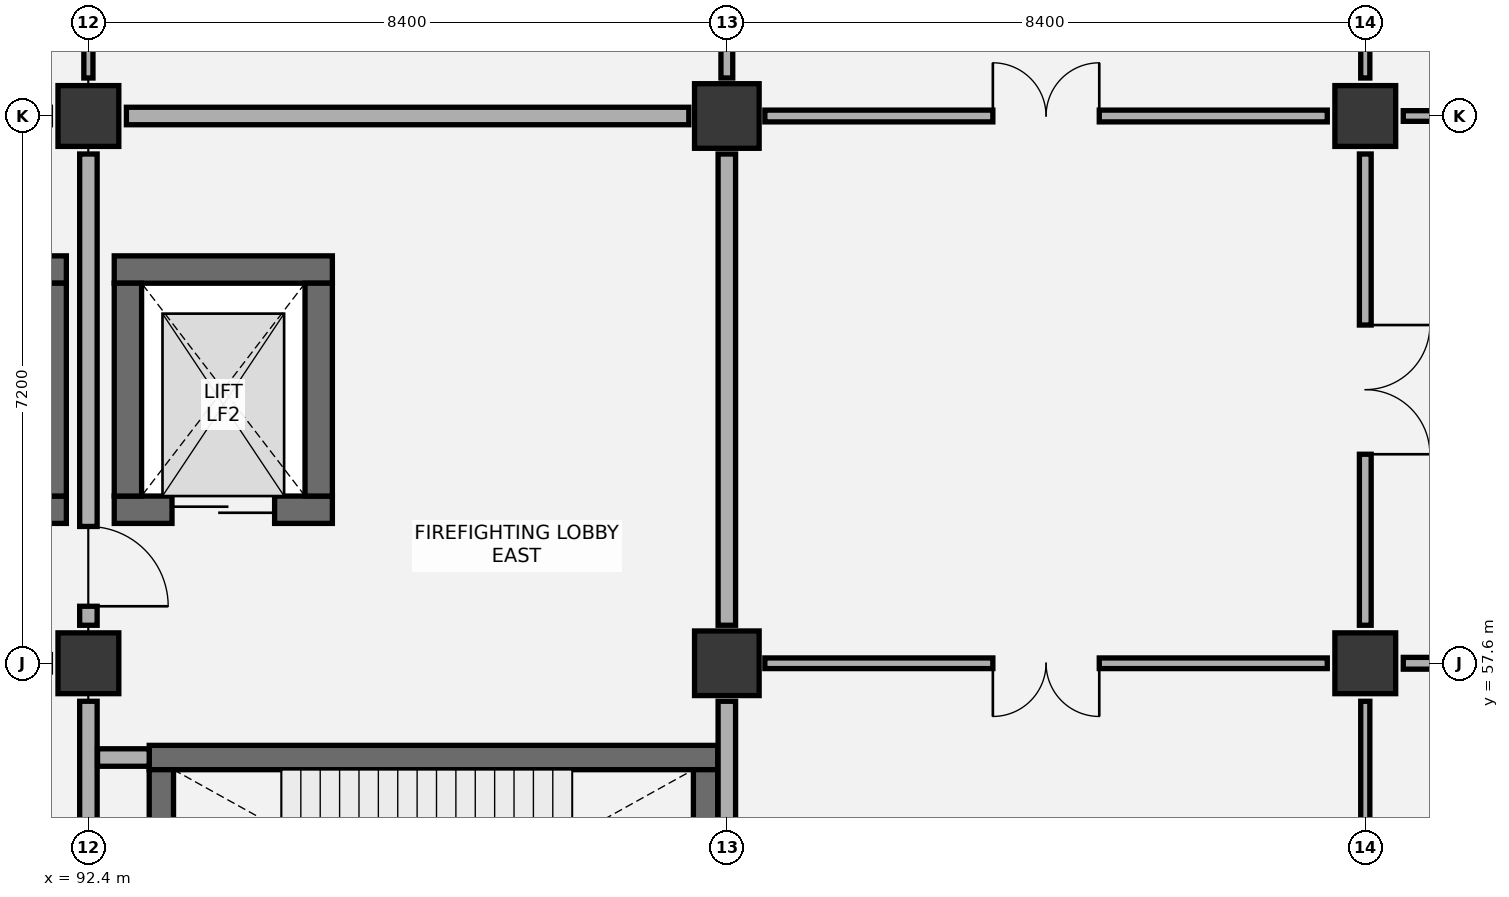
"""IFC4 building model, lengths in metres.
Left out: names, types, materials, properties, quantities, classifications, styles, units other than length and angle.
Written with IfcOpenShell. Run it as: python <this file> out.ifc"""

import sys

from ifc_helpers import new_model, si_unit, direction, frame, frame_2d, origin, origin_2d, place, context, subcontext, project, spatial, rectangle, extrude, element, fill, save


model = new_model("IFC4")
c1 = context("Model", 3, precision=1e-05, world=origin(), true_north=direction((0.0, 1.0)))
c2 = subcontext(c1, "Body", "Model", "MODEL_VIEW")
j1 = project(units=[si_unit("LENGTHUNIT", "METRE"), si_unit("PLANEANGLEUNIT", "RADIAN")], contexts=[c1])
p1 = place(None, origin())
s1 = spatial("IfcSite", under=j1, at=p1, CompositionType="ELEMENT")
p2 = place(p1, origin())
s2 = spatial("IfcBuilding", under=s1, at=p2, CompositionType="ELEMENT")
p3 = place(p2, frame((0.0, 0.0, 11.4)))
s3 = spatial("IfcBuildingStorey", under=s2, at=p3, CompositionType="ELEMENT", Elevation=11.4)
for number, where, z_axis, x_axis in (
    (1, (92.4, 57.6, 0.0), (0.0, 0.0, 1.0), (1.0, 0.0, 0.0)),
    (2, (92.4, 64.8, 0.0), (0.0, 0.0, 1.0), (1.0, 0.0, 0.0)),
):
    element("IfcColumn", number, at=place(p3, frame(where, z_axis=z_axis, x_axis=x_axis)), inside=s3, PredefinedType="COLUMN", context=c2, shape_type="SweptSolid", body=[
        extrude(rectangle(XDim=0.8, YDim=0.8, at=origin_2d()), origin(), (0.0, 0.0, 1.0), 5.4),
    ])
for number, where, z_axis, x_axis in (
    (3, (100.8, 57.6, 0.0), (0.0, 0.0, 1.0), (1.0, 0.0, 0.0)),
    (4, (100.8, 64.8, 0.0), (0.0, 0.0, 1.0), (1.0, 0.0, 0.0)),
):
    element("IfcColumn", number, at=place(p3, frame(where, z_axis=z_axis, x_axis=x_axis)), inside=s3, PredefinedType="COLUMN", context=c2, shape_type="SweptSolid", body=[
        extrude(rectangle(XDim=0.85, YDim=0.85, at=origin_2d()), origin(), (0.0, 0.0, 1.0), 5.4),
    ])
for number, where, z_axis, x_axis in (
    (5, (109.2, 57.6, 0.0), (0.0, 0.0, 1.0), (1.0, 0.0, 0.0)),
    (6, (109.2, 64.8, 0.0), (0.0, 0.0, 1.0), (1.0, 0.0, 0.0)),
):
    element("IfcColumn", number, at=place(p3, frame(where, z_axis=z_axis, x_axis=x_axis)), inside=s3, PredefinedType="COLUMN", context=c2, shape_type="SweptSolid", body=[
        extrude(rectangle(XDim=0.8, YDim=0.8, at=origin_2d()), origin(), (0.0, 0.0, 1.0), 5.4),
    ])
p4 = place(p3, frame((93.2, 56.36, 0.0), z_axis=(0.0, 0.0, 1.0), x_axis=(1.0, 0.0, 0.0)))
e7 = element("IfcWall", 7, at=p4, inside=s3, PredefinedType="SHEAR", context=c2, shape_type="SweptSolid", body=[
    extrude(rectangle(XDim=7.48, YDim=0.32, at=frame_2d((3.74, 0.0))), origin(), (0.0, 0.0, 1.0), 5.1),
])
for number, where, z_axis, x_axis in (
    (8, (93.36, 52.4, 0.0), (0.0, 0.0, 1.0), (0.0, 1.0, 0.0)),
    (9, (100.52, 52.4, 0.0), (0.0, 0.0, 1.0), (0.0, 1.0, 0.0)),
):
    element("IfcWall", number, at=place(p3, frame(where, z_axis=z_axis, x_axis=x_axis)), inside=s3, PredefinedType="SHEAR", context=c2, shape_type="SweptSolid", body=[
        extrude(rectangle(XDim=3.8, YDim=0.32, at=frame_2d((1.9, 0.0))), origin(), (0.0, 0.0, 1.0), 5.1),
    ])
p5 = place(p3, frame((84.34, 62.78, 0.0), z_axis=(0.0, 0.0, 1.0), x_axis=(1.0, 0.0, 0.0)))
e10 = element("IfcWall", 10, at=p5, inside=s3, PredefinedType="SHEAR", context=c2, shape_type="SweptSolid", body=[
    extrude(rectangle(XDim=7.77, YDim=0.36, at=frame_2d((3.885, 0.0))), origin(), (0.0, 0.0, 1.0), 5.1),
])
p6 = place(p3, frame((89.45, 59.62, 0.0), z_axis=(0.0, 0.0, 1.0), x_axis=(1.0, 0.0, 0.0)))
e11 = element("IfcWall", 11, at=p6, inside=s3, PredefinedType="SHEAR", context=c2, shape_type="SweptSolid", body=[
    extrude(rectangle(XDim=2.66, YDim=0.36, at=frame_2d((1.33, 0.0))), origin(), (0.0, 0.0, 1.0), 5.1),
])
p7 = place(p6, frame((0.78, 0.0, 0.0)))
e12 = element("IfcOpeningElement", 12, at=p7, cuts=e11, PredefinedType="OPENING", context=c2, shape_type="SweptSolid", body=[
    extrude(rectangle(XDim=1.1, YDim=2.15, at=frame_2d((0.55, 1.075))), frame((0.0, 0.19, 0.0), z_axis=(0.0, -1.0, 0.0), x_axis=(1.0, 0.0, 0.0)), (0.0, 0.0, 1.0), 0.38),
])
p8 = place(p3, frame((91.93, 59.8, 0.0), z_axis=(0.0, 0.0, 1.0), x_axis=(0.0, 1.0, 0.0)))
e13 = element("IfcWall", 13, at=p8, inside=s3, PredefinedType="SHEAR", context=c2, shape_type="SweptSolid", body=[
    extrude(rectangle(XDim=2.8, YDim=0.36, at=frame_2d((1.4, 0.0))), origin(), (0.0, 0.0, 1.0), 5.1),
])
p9 = place(p3, frame((92.74, 62.78, 0.0), z_axis=(0.0, 0.0, 1.0), x_axis=(1.0, 0.0, 0.0)))
e14 = element("IfcWall", 14, at=p9, inside=s3, PredefinedType="SHEAR", context=c2, shape_type="SweptSolid", body=[
    extrude(rectangle(XDim=2.87, YDim=0.36, at=frame_2d((1.435, 0.0))), origin(), (0.0, 0.0, 1.0), 5.1),
])
p10 = place(p3, frame((92.74, 59.62, 0.0), z_axis=(0.0, 0.0, 1.0), x_axis=(1.0, 0.0, 0.0)))
e15 = element("IfcWall", 15, at=p10, inside=s3, PredefinedType="SHEAR", context=c2, shape_type="SweptSolid", body=[
    extrude(rectangle(XDim=2.87, YDim=0.36, at=frame_2d((1.435, 0.0))), origin(), (0.0, 0.0, 1.0), 5.1),
])
p11 = place(p10, frame((0.76, 0.0, 0.0)))
e16 = element("IfcOpeningElement", 16, at=p11, cuts=e15, PredefinedType="OPENING", context=c2, shape_type="SweptSolid", body=[
    extrude(rectangle(XDim=1.35, YDim=2.2, at=frame_2d((0.675, 1.1))), frame((0.0, 0.19, 0.0), z_axis=(0.0, -1.0, 0.0), x_axis=(1.0, 0.0, 0.0)), (0.0, 0.0, 1.0), 0.38),
])
for number, where, z_axis, x_axis in (
    (17, (92.92, 59.8, 0.0), (0.0, 0.0, 1.0), (0.0, 1.0, 0.0)),
    (18, (95.43, 59.8, 0.0), (0.0, 0.0, 1.0), (0.0, 1.0, 0.0)),
):
    element("IfcWall", number, at=place(p3, frame(where, z_axis=z_axis, x_axis=x_axis)), inside=s3, PredefinedType="SHEAR", context=c2, shape_type="SweptSolid", body=[
        extrude(rectangle(XDim=2.8, YDim=0.36, at=frame_2d((1.4, 0.0))), origin(), (0.0, 0.0, 1.0), 5.1),
    ])
p12 = place(p3, frame((92.4, 50.9, 0.0), z_axis=(0.0, 0.0, 1.0), x_axis=(0.0, 1.0, 0.0)))
e19 = element("IfcWall", 19, at=p12, inside=s3, PredefinedType="PARTITIONING", context=c2, shape_type="SweptSolid", body=[
    extrude(rectangle(XDim=6.2, YDim=0.23, at=frame_2d((3.1, 0.0))), origin(), (0.0, 0.0, 1.0), 4.805),
])
p13 = place(p12, frame((0.05, 0.0, 0.0)))
e20 = element("IfcOpeningElement", 20, at=p13, cuts=e19, PredefinedType="OPENING", context=c2, shape_type="SweptSolid", body=[
    extrude(rectangle(XDim=1.05, YDim=2.15, at=frame_2d((0.525, 1.075))), frame((0.0, 0.125, 0.0), z_axis=(0.0, -1.0, 0.0), x_axis=(1.0, 0.0, 0.0)), (0.0, 0.0, 1.0), 0.25),
])
p14 = place(p3, frame((92.4, 58.1, 0.0), z_axis=(0.0, 0.0, 1.0), x_axis=(0.0, 1.0, 0.0)))
e21 = element("IfcWall", 21, at=p14, inside=s3, PredefinedType="PARTITIONING", context=c2, shape_type="SweptSolid", body=[
    extrude(rectangle(XDim=6.2, YDim=0.23, at=frame_2d((3.1, 0.0))), origin(), (0.0, 0.0, 1.0), 4.395),
])
p15 = place(p14, frame((0.25, 0.0, 0.0)))
e22 = element("IfcOpeningElement", 22, at=p15, cuts=e21, PredefinedType="OPENING", context=c2, shape_type="SweptSolid", body=[
    extrude(rectangle(XDim=1.05, YDim=2.15, at=frame_2d((0.525, 1.075))), frame((0.0, 0.125, 0.0), z_axis=(0.0, -1.0, 0.0), x_axis=(1.0, 0.0, 0.0)), (0.0, 0.0, 1.0), 0.25),
])
p16 = place(p3, frame((92.4, 65.3, 0.0), z_axis=(0.0, 0.0, 1.0), x_axis=(0.0, 1.0, 0.0)))
e23 = element("IfcWall", 23, at=p16, inside=s3, PredefinedType="PARTITIONING", context=c2, shape_type="SweptSolid", body=[
    extrude(rectangle(XDim=6.2, YDim=0.12, at=frame_2d((3.1, 0.0))), origin(), (0.0, 0.0, 1.0), 4.595),
])
p17 = place(p3, frame((100.8, 50.9, 0.0), z_axis=(0.0, 0.0, 1.0), x_axis=(0.0, 1.0, 0.0)))
e24 = element("IfcWall", 24, at=p17, inside=s3, PredefinedType="PARTITIONING", context=c2, shape_type="SweptSolid", body=[
    extrude(rectangle(XDim=6.2, YDim=0.23, at=frame_2d((3.1, 0.0))), origin(), (0.0, 0.0, 1.0), 4.395),
])
p18 = place(p3, frame((92.52, 56.36, 0.0), z_axis=(0.0, 0.0, 1.0), x_axis=(1.0, 0.0, 0.0)))
e25 = element("IfcWall", 25, at=p18, inside=s3, PredefinedType="PARTITIONING", context=c2, shape_type="SweptSolid", body=[
    extrude(rectangle(XDim=0.68, YDim=0.23, at=frame_2d((0.34, 0.0))), origin(), (0.0, 0.0, 1.0), 5.1),
])
p19 = place(p3, frame((100.8, 58.1, 0.0), z_axis=(0.0, 0.0, 1.0), x_axis=(0.0, 1.0, 0.0)))
e26 = element("IfcWall", 26, at=p19, inside=s3, PredefinedType="PARTITIONING", context=c2, shape_type="SweptSolid", body=[
    extrude(rectangle(XDim=6.2, YDim=0.23, at=frame_2d((3.1, 0.0))), origin(), (0.0, 0.0, 1.0), 4.595),
])
p20 = place(p3, frame((92.9, 64.8, 0.0), z_axis=(0.0, 0.0, 1.0), x_axis=(1.0, 0.0, 0.0)))
e27 = element("IfcWall", 27, at=p20, inside=s3, PredefinedType="PARTITIONING", context=c2, shape_type="SweptSolid", body=[
    extrude(rectangle(XDim=7.4, YDim=0.23, at=frame_2d((3.7, 0.0))), origin(), (0.0, 0.0, 1.0), 4.345),
])
p21 = place(p3, frame((100.8, 65.3, 0.0), z_axis=(0.0, 0.0, 1.0), x_axis=(0.0, 1.0, 0.0)))
e28 = element("IfcWall", 28, at=p21, inside=s3, PredefinedType="PARTITIONING", context=c2, shape_type="SweptSolid", body=[
    extrude(rectangle(XDim=6.2, YDim=0.155, at=frame_2d((3.1, 0.0))), origin(), (0.0, 0.0, 1.0), 4.395),
])
p22 = place(p21, frame((2.25, 0.0, 0.0)))
e29 = element("IfcOpeningElement", 29, at=p22, cuts=e28, PredefinedType="OPENING", context=c2, shape_type="SweptSolid", body=[
    extrude(rectangle(XDim=1.7, YDim=2.25, at=frame_2d((0.85, 1.125))), frame((0.0, 0.087, 0.0), z_axis=(0.0, -1.0, 0.0), x_axis=(1.0, 0.0, 0.0)), (0.0, 0.0, 1.0), 0.175),
])
p23 = place(p3, frame((109.2, 50.9, 0.0), z_axis=(0.0, 0.0, 1.0), x_axis=(0.0, 1.0, 0.0)))
e30 = element("IfcWall", 30, at=p23, inside=s3, PredefinedType="PARTITIONING", context=c2, shape_type="SweptSolid", body=[
    extrude(rectangle(XDim=6.2, YDim=0.12, at=frame_2d((3.1, 0.0))), origin(), (0.0, 0.0, 1.0), 4.595),
])
p24 = place(p3, frame((101.3, 57.6, 0.0), z_axis=(0.0, 0.0, 1.0), x_axis=(1.0, 0.0, 0.0)))
e31 = element("IfcWall", 31, at=p24, inside=s3, PredefinedType="PARTITIONING", context=c2, shape_type="SweptSolid", body=[
    extrude(rectangle(XDim=7.4, YDim=0.14, at=frame_2d((3.7, 0.0))), origin(), (0.0, 0.0, 1.0), 4.345),
])
p25 = place(p24, frame((3.0, 0.0, 0.0)))
e32 = element("IfcOpeningElement", 32, at=p25, cuts=e31, PredefinedType="OPENING", context=c2, shape_type="SweptSolid", body=[
    extrude(rectangle(XDim=1.4, YDim=2.15, at=frame_2d((0.7, 1.075))), frame((0.0, 0.08, 0.0), z_axis=(0.0, -1.0, 0.0), x_axis=(1.0, 0.0, 0.0)), (0.0, 0.0, 1.0), 0.16),
])
p26 = place(p3, frame((109.2, 58.1, 0.0), z_axis=(0.0, 0.0, 1.0), x_axis=(0.0, 1.0, 0.0)))
e33 = element("IfcWall", 33, at=p26, inside=s3, PredefinedType="PARTITIONING", context=c2, shape_type="SweptSolid", body=[
    extrude(rectangle(XDim=6.2, YDim=0.155, at=frame_2d((3.1, 0.0))), origin(), (0.0, 0.0, 1.0), 4.395),
])
p27 = place(p26, frame((2.25, 0.0, 0.0)))
e34 = element("IfcOpeningElement", 34, at=p27, cuts=e33, PredefinedType="OPENING", context=c2, shape_type="SweptSolid", body=[
    extrude(rectangle(XDim=1.7, YDim=2.25, at=frame_2d((0.85, 1.125))), frame((0.0, 0.087, 0.0), z_axis=(0.0, -1.0, 0.0), x_axis=(1.0, 0.0, 0.0)), (0.0, 0.0, 1.0), 0.175),
])
p28 = place(p3, frame((101.3, 64.8, 0.0), z_axis=(0.0, 0.0, 1.0), x_axis=(1.0, 0.0, 0.0)))
e35 = element("IfcWall", 35, at=p28, inside=s3, PredefinedType="PARTITIONING", context=c2, shape_type="SweptSolid", body=[
    extrude(rectangle(XDim=7.4, YDim=0.155, at=frame_2d((3.7, 0.0))), origin(), (0.0, 0.0, 1.0), 4.345),
])
p29 = place(p28, frame((3.0, 0.0, 0.0)))
e36 = element("IfcOpeningElement", 36, at=p29, cuts=e35, PredefinedType="OPENING", context=c2, shape_type="SweptSolid", body=[
    extrude(rectangle(XDim=1.4, YDim=2.15, at=frame_2d((0.7, 1.075))), frame((0.0, 0.087, 0.0), z_axis=(0.0, -1.0, 0.0), x_axis=(1.0, 0.0, 0.0)), (0.0, 0.0, 1.0), 0.175),
])
p30 = place(p3, frame((109.2, 65.3, 0.0), z_axis=(0.0, 0.0, 1.0), x_axis=(0.0, 1.0, 0.0)))
e37 = element("IfcWall", 37, at=p30, inside=s3, PredefinedType="PARTITIONING", context=c2, shape_type="SweptSolid", body=[
    extrude(rectangle(XDim=6.2, YDim=0.12, at=frame_2d((3.1, 0.0))), origin(), (0.0, 0.0, 1.0), 4.695),
])
p31 = place(p3, frame((109.7, 57.6, 0.0), z_axis=(0.0, 0.0, 1.0), x_axis=(1.0, 0.0, 0.0)))
e38 = element("IfcWall", 38, at=p31, inside=s3, PredefinedType="PARTITIONING", context=c2, shape_type="SweptSolid", body=[
    extrude(rectangle(XDim=7.4, YDim=0.155, at=frame_2d((3.7, 0.0))), origin(), (0.0, 0.0, 1.0), 4.345),
])
p32 = place(p31, frame((3.0, 0.0, 0.0)))
e39 = element("IfcOpeningElement", 39, at=p32, cuts=e38, PredefinedType="OPENING", context=c2, shape_type="SweptSolid", body=[
    extrude(rectangle(XDim=1.4, YDim=2.15, at=frame_2d((0.7, 1.075))), frame((0.0, 0.087, 0.0), z_axis=(0.0, -1.0, 0.0), x_axis=(1.0, 0.0, 0.0)), (0.0, 0.0, 1.0), 0.175),
])
p33 = place(p3, frame((109.7, 64.8, 0.0), z_axis=(0.0, 0.0, 1.0), x_axis=(1.0, 0.0, 0.0)))
e40 = element("IfcWall", 40, at=p33, inside=s3, PredefinedType="PARTITIONING", context=c2, shape_type="SweptSolid", body=[
    extrude(rectangle(XDim=7.4, YDim=0.14, at=frame_2d((3.7, 0.0))), origin(), (0.0, 0.0, 1.0), 4.345),
])
p34 = place(p33, frame((2.85, 0.0, 0.0)))
e41 = element("IfcOpeningElement", 41, at=p34, cuts=e40, PredefinedType="OPENING", context=c2, shape_type="SweptSolid", body=[
    extrude(rectangle(XDim=1.7, YDim=2.25, at=frame_2d((0.85, 1.125))), frame((0.0, 0.08, 0.0), z_axis=(0.0, -1.0, 0.0), x_axis=(1.0, 0.0, 0.0)), (0.0, 0.0, 1.0), 0.16),
])
p35 = place(p11, origin())
e42 = element("IfcDoor", 42, at=p35, inside=s3, OperationType="DOUBLE_DOOR_SLIDING", PredefinedType="DOOR", context=c2, shape_type="SweptSolid", body=[
    extrude(rectangle(XDim=1.35, YDim=2.2, at=frame_2d((0.675, 1.1))), frame((0.0, 0.025, 0.0), z_axis=(0.0, -1.0, 0.0), x_axis=(1.0, 0.0, 0.0)), (0.0, 0.0, 1.0), 0.05),
])
fill(e16, e42)
p36 = place(p15, frame((1.05, 0.0, 0.0), z_axis=(0.0, 0.0, 1.0), x_axis=(-1.0, 0.0, 0.0)))
e43 = element("IfcDoor", 43, at=p36, inside=s3, OperationType="SINGLE_SWING_RIGHT", PredefinedType="DOOR", context=c2, shape_type="SweptSolid", body=[
    extrude(rectangle(XDim=1.05, YDim=2.15, at=frame_2d((0.525, 1.075))), frame((0.0, 0.025, 0.0), z_axis=(0.0, -1.0, 0.0), x_axis=(1.0, 0.0, 0.0)), (0.0, 0.0, 1.0), 0.05),
])
fill(e22, e43)
p37 = place(p25, frame((1.4, 0.0, 0.0), z_axis=(0.0, 0.0, 1.0), x_axis=(-1.0, 0.0, 0.0)))
e44 = element("IfcDoor", 44, at=p37, inside=s3, OperationType="DOUBLE_DOOR_SINGLE_SWING", PredefinedType="DOOR", context=c2, shape_type="SweptSolid", body=[
    extrude(rectangle(XDim=1.4, YDim=2.15, at=frame_2d((0.7, 1.075))), frame((0.0, 0.025, 0.0), z_axis=(0.0, -1.0, 0.0), x_axis=(1.0, 0.0, 0.0)), (0.0, 0.0, 1.0), 0.05),
])
fill(e32, e44)
p38 = place(p27, frame((1.7, 0.0, 0.0), z_axis=(0.0, 0.0, 1.0), x_axis=(-1.0, 0.0, 0.0)))
e45 = element("IfcDoor", 45, at=p38, inside=s3, OperationType="DOUBLE_DOOR_SINGLE_SWING", PredefinedType="DOOR", context=c2, shape_type="SweptSolid", body=[
    extrude(rectangle(XDim=1.7, YDim=2.25, at=frame_2d((0.85, 1.125))), frame((0.0, 0.025, 0.0), z_axis=(0.0, -1.0, 0.0), x_axis=(1.0, 0.0, 0.0)), (0.0, 0.0, 1.0), 0.05),
])
fill(e34, e45)
p39 = place(p29, origin())
e46 = element("IfcDoor", 46, at=p39, inside=s3, OperationType="DOUBLE_DOOR_SINGLE_SWING", PredefinedType="DOOR", context=c2, shape_type="SweptSolid", body=[
    extrude(rectangle(XDim=1.4, YDim=2.15, at=frame_2d((0.7, 1.075))), frame((0.0, 0.025, 0.0), z_axis=(0.0, -1.0, 0.0), x_axis=(1.0, 0.0, 0.0)), (0.0, 0.0, 1.0), 0.05),
])
fill(e36, e46)
save(model, sys.argv[1])
